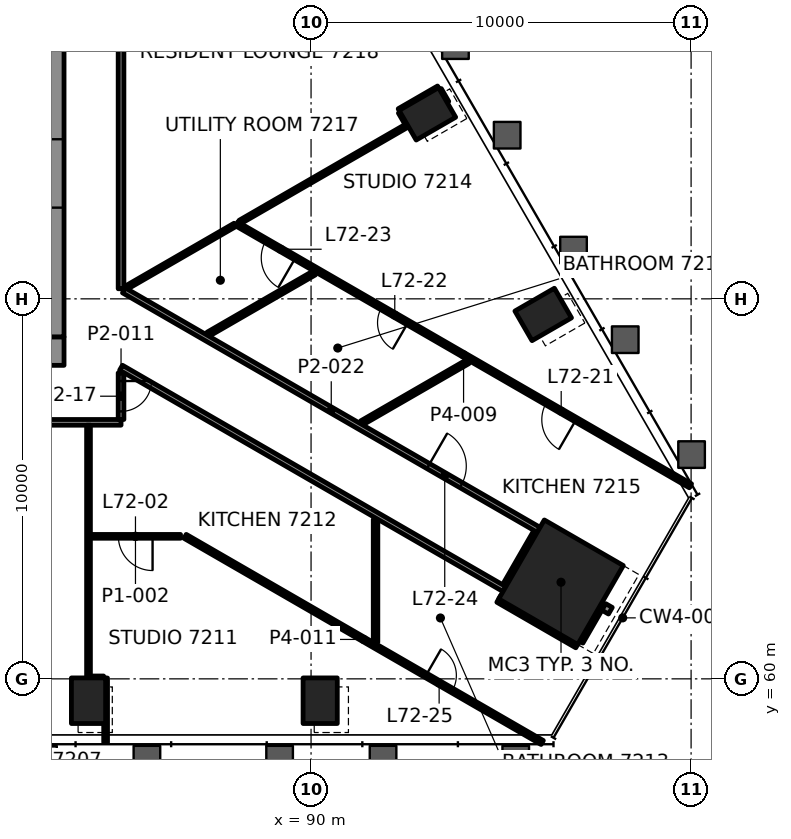
"""IFC4 building model, lengths in metres.
Left out: names, types, materials, properties, quantities, classifications, styles, units other than length and angle.
Written with IfcOpenShell. Run it as: python <this file> out.ifc"""

import sys

from ifc_helpers import new_model, si_unit, direction, frame, frame_2d, origin, origin_2d, place, context, subcontext, project, spatial, rectangle, hollow_rectangle, extrude, element, fill, save


model = new_model("IFC4")
c1 = context("Model", 3, precision=1e-05, world=origin(), true_north=direction((0.0, 1.0)))
c2 = subcontext(c1, "Body", "Model", "MODEL_VIEW")
j1 = project(units=[si_unit("LENGTHUNIT", "METRE"), si_unit("PLANEANGLEUNIT", "RADIAN")], contexts=[c1])
p1 = place(None, origin())
s1 = spatial("IfcSite", under=j1, at=p1, CompositionType="ELEMENT")
p2 = place(p1, origin())
s2 = spatial("IfcBuilding", under=s1, at=p2, CompositionType="ELEMENT")
p3 = place(p2, frame((0.0, 0.0, 298.6)))
s3 = spatial("IfcBuildingStorey", under=s2, at=p3, CompositionType="ELEMENT", Elevation=298.6)
p4 = place(p3, frame((96.577, 62.542, 0.0), z_axis=(0.0, 0.0, 1.0), x_axis=(0.5, 0.866025403784, 0.0)))
e1 = element("IfcColumn", 1, at=p4, inside=s3, PredefinedType="COLUMN", context=c2, shape_type="SweptSolid", body=[
    extrude(rectangle(XDim=2.4, YDim=2.4, at=origin_2d()), origin(), (0.0, 0.0, 1.0), 3.5),
])
for number, where, z_axis, x_axis in (
    (2, (84.144, 59.425, -0.0), (0.0, 0.0, 1.0), (1.0, 0.0, 0.0)),
    (3, (90.24, 59.425, -0.0), (0.0, 0.0, 1.0), (1.0, 0.0, 0.0)),
    (4, (96.109, 69.589, -0.0), (0.0, 0.0, 1.0), (-0.5, 0.866, 0.0)),
    (5, (93.061, 74.869, -0.0), (0.0, 0.0, 1.0), (-0.5, 0.866, 0.0)),
):
    element("IfcColumn", number, at=place(p3, frame(where, z_axis=z_axis, x_axis=x_axis)), inside=s3, PredefinedType="COLUMN", context=c2, shape_type="SweptSolid", body=[
        extrude(hollow_rectangle(XDim=0.9, YDim=1.2, WallThickness=0.06, at=origin_2d()), origin(), (0.0, 0.0, 1.0), 3.5),
    ])
p5 = place(p3, frame((66.5, 68.625, 0.0), z_axis=(0.0, 0.0, 1.0), x_axis=(1.0, 0.0, 0.0)))
e6 = element("IfcWall", 6, at=p5, inside=s3, PredefinedType="SHEAR", context=c2, shape_type="SweptSolid", body=[
    extrude(rectangle(XDim=17.0, YDim=0.75, at=frame_2d((8.5, 0.0))), origin(), (0.0, 0.0, 1.0), 3.3),
])
p6 = place(p5, frame((1.9, 0.0, 0.0)))
e7 = element("IfcOpeningElement", 7, at=p6, cuts=e6, PredefinedType="OPENING", context=c2, shape_type="SweptSolid", body=[
    extrude(rectangle(XDim=0.9, YDim=2.1, at=frame_2d((0.45, 1.05))), frame((0.0, 0.385, 0.0), z_axis=(0.0, -1.0, 0.0), x_axis=(1.0, 0.0, 0.0)), (0.0, 0.0, 1.0), 0.77),
])
p7 = place(p3, frame((83.125, 69.0, 0.0), z_axis=(0.0, 0.0, 1.0), x_axis=(0.0, 1.0, 0.0)))
e8 = element("IfcWall", 8, at=p7, inside=s3, PredefinedType="SHEAR", context=c2, shape_type="SweptSolid", body=[
    extrude(rectangle(XDim=12.0, YDim=0.75, at=frame_2d((6.0, 0.0))), origin(), (0.0, 0.0, 1.0), 3.3),
])
p8 = place(p7, frame((3.4, 0.0, 0.0)))
e9 = element("IfcOpeningElement", 9, at=p8, cuts=e8, PredefinedType="OPENING", context=c2, shape_type="SweptSolid", body=[
    extrude(rectangle(XDim=1.8, YDim=2.1, at=frame_2d((0.9, 1.05))), frame((0.0, 0.385, 0.0), z_axis=(0.0, -1.0, 0.0), x_axis=(1.0, 0.0, 0.0)), (0.0, 0.0, 1.0), 0.77),
])
p9 = place(p3, frame((84.194, 60.025, 0.0), z_axis=(0.0, 0.0, 1.0), x_axis=(1.0, 0.0, 0.0)))
e10 = element("IfcWall", 10, at=p9, inside=s3, PredefinedType="PARTITIONING", context=c2, shape_type="SweptSolid", body=[
    extrude(rectangle(XDim=0.347, YDim=0.1, at=frame_2d((0.173, 0.0))), origin(), (0.0, 0.0, 1.0), 2.7),
])
p10 = place(p3, frame((86.566, 63.75, 0.0), z_axis=(0.0, 0.0, 1.0), x_axis=(-1.0, 0.0, 0.0)))
e11 = element("IfcWall", 11, at=p10, inside=s3, PredefinedType="PARTITIONING", context=c2, shape_type="SweptSolid", body=[
    extrude(rectangle(XDim=2.372, YDim=0.1, at=frame_2d((1.186, 0.0))), origin(), (0.0, 0.0, 1.0), 2.7),
])
p11 = place(p10, frame((0.736, 0.0, 0.0)))
e12 = element("IfcOpeningElement", 12, at=p11, cuts=e11, PredefinedType="OPENING", context=c2, shape_type="SweptSolid", body=[
    extrude(rectangle(XDim=0.9, YDim=2.1, at=frame_2d((0.45, 1.05))), frame((0.0, 0.06, 0.0), z_axis=(0.0, -1.0, 0.0), x_axis=(1.0, 0.0, 0.0)), (0.0, 0.0, 1.0), 0.12),
])
p12 = place(p3, frame((85.0, 66.75, 0.0), z_axis=(0.0, 0.0, 1.0), x_axis=(-1.0, 0.0, 0.0)))
e13 = element("IfcWall", 13, at=p12, inside=s3, PredefinedType="PARTITIONING", context=c2, shape_type="SweptSolid", body=[
    extrude(rectangle(XDim=20.0, YDim=0.15, at=frame_2d((10.0, 0.0))), origin(), (0.0, 0.0, 1.0), 2.7),
])
p13 = place(p12, frame((5.486, 0.0, 0.0)))
e14 = element("IfcOpeningElement", 14, at=p13, cuts=e13, PredefinedType="OPENING", context=c2, shape_type="SweptSolid", body=[
    extrude(rectangle(XDim=0.9, YDim=2.1, at=frame_2d((0.45, 1.05))), frame((0.0, 0.085, 0.0), z_axis=(0.0, -1.0, 0.0), x_axis=(1.0, 0.0, 0.0)), (0.0, 0.0, 1.0), 0.17),
])
p14 = place(p12, frame((11.582, 0.0, 0.0)))
e15 = element("IfcOpeningElement", 15, at=p14, cuts=e13, PredefinedType="OPENING", context=c2, shape_type="SweptSolid", body=[
    extrude(rectangle(XDim=0.9, YDim=2.1, at=frame_2d((0.45, 1.05))), frame((0.0, 0.085, 0.0), z_axis=(0.0, -1.0, 0.0), x_axis=(1.0, 0.0, 0.0)), (0.0, 0.0, 1.0), 0.17),
])
p15 = place(p12, frame((13.614, 0.0, 0.0)))
e16 = element("IfcOpeningElement", 16, at=p15, cuts=e13, PredefinedType="OPENING", context=c2, shape_type="SweptSolid", body=[
    extrude(rectangle(XDim=0.9, YDim=2.1, at=frame_2d((0.45, 1.05))), frame((0.0, 0.085, 0.0), z_axis=(0.0, -1.0, 0.0), x_axis=(1.0, 0.0, 0.0)), (0.0, 0.0, 1.0), 0.17),
])
p16 = place(p12, frame((15.646, 0.0, 0.0)))
e17 = element("IfcOpeningElement", 17, at=p16, cuts=e13, PredefinedType="OPENING", context=c2, shape_type="SweptSolid", body=[
    extrude(rectangle(XDim=0.9, YDim=2.1, at=frame_2d((0.45, 1.05))), frame((0.0, 0.085, 0.0), z_axis=(0.0, -1.0, 0.0), x_axis=(1.0, 0.0, 0.0)), (0.0, 0.0, 1.0), 0.17),
])
p17 = place(p12, frame((17.678, 0.0, 0.0)))
e18 = element("IfcOpeningElement", 18, at=p17, cuts=e13, PredefinedType="OPENING", context=c2, shape_type="SweptSolid", body=[
    extrude(rectangle(XDim=0.9, YDim=2.1, at=frame_2d((0.45, 1.05))), frame((0.0, 0.085, 0.0), z_axis=(0.0, -1.0, 0.0), x_axis=(1.0, 0.0, 0.0)), (0.0, 0.0, 1.0), 0.17),
])
for number, where, z_axis, x_axis in (
    (19, (91.333, 66.736, 0.0), (0.0, 0.0, 1.0), (0.866, 0.5, 0.0)),
    (20, (87.292, 69.069, 0.0), (0.0, 0.0, 1.0), (0.866, 0.5, 0.0)),
):
    element("IfcWall", number, at=place(p3, frame(where, z_axis=z_axis, x_axis=x_axis)), inside=s3, PredefinedType="PARTITIONING", context=c2, shape_type="SweptSolid", body=[
        extrude(rectangle(XDim=3.228, YDim=0.12, at=frame_2d((1.614, 0.0))), origin(), (0.0, 0.0, 1.0), 2.7),
    ])
p18 = place(p3, frame((85.145, 70.299, 0.0), z_axis=(0.0, 0.0, 1.0), x_axis=(0.866032610133, 0.499987518031, 0.0)))
e21 = element("IfcWall", 21, at=p18, inside=s3, PredefinedType="PARTITIONING", context=c2, shape_type="SweptSolid", body=[
    extrude(rectangle(XDim=3.295, YDim=0.1, at=frame_2d((1.648, 0.0))), origin(), (0.0, 0.0, 1.0), 2.7),
])
p19 = place(p3, frame((92.318, 74.959, 0.0), z_axis=(0.0, 0.0, 1.0), x_axis=(0.866087020037, 0.499893262331, 0.0)))
e22 = element("IfcWall", 22, at=p19, inside=s3, PredefinedType="PARTITIONING", context=c2, shape_type="SweptSolid", body=[
    extrude(rectangle(XDim=1.196, YDim=0.1, at=frame_2d((0.598, 0.0))), origin(), (0.0, 0.0, 1.0), 2.688),
])
p20 = place(p3, frame((97.067, 60.99, 0.0), z_axis=(0.0, 0.0, 1.0), x_axis=(0.499818604933, 0.866130106949, 0.0)))
e23 = element("IfcWall", 23, at=p20, inside=s3, PredefinedType="PARTITIONING", context=c2, shape_type="SweptSolid", body=[
    extrude(rectangle(XDim=1.099, YDim=0.2, at=frame_2d((0.55, 0.0))), origin(), (0.0, 0.0, 1.0), 2.7),
])
p21 = place(p3, frame((95.128, 62.433, 0.0), z_axis=(0.0, 0.0, 1.0), x_axis=(0.500052415518, 0.865995139556, 0.0)))
e24 = element("IfcWall", 24, at=p21, inside=s3, PredefinedType="PARTITIONING", context=c2, shape_type="SweptSolid", body=[
    extrude(rectangle(XDim=1.644, YDim=0.2, at=frame_2d((0.822, 0.0))), origin(), (0.0, 0.0, 1.0), 2.547),
])
p22 = place(p3, frame((91.697, 60.966, 0.0), z_axis=(0.0, 0.0, 1.0), x_axis=(0.0, 1.0, 0.0)))
e25 = element("IfcWall", 25, at=p22, inside=s3, PredefinedType="PARTITIONING", context=c2, shape_type="SweptSolid", body=[
    extrude(rectangle(XDim=3.228, YDim=0.12, at=frame_2d((1.614, 0.0))), origin(), (0.0, 0.0, 1.0), 2.7),
])
p23 = place(p3, frame((85.0, 68.051, 0.0), z_axis=(0.0, 0.0, 1.0), x_axis=(0.0, -1.0, 0.0)))
e26 = element("IfcWall", 26, at=p23, inside=s3, PredefinedType="PARTITIONING", context=c2, shape_type="SweptSolid", body=[
    extrude(rectangle(XDim=1.226, YDim=0.15, at=frame_2d((0.613, 0.0))), origin(), (0.0, 0.0, 1.0), 2.547),
])
p24 = place(p23, frame((0.213, 0.0, 0.0)))
e27 = element("IfcOpeningElement", 27, at=p24, cuts=e26, PredefinedType="OPENING", context=c2, shape_type="SweptSolid", body=[
    extrude(rectangle(XDim=0.8, YDim=2.1, at=frame_2d((0.4, 1.05))), frame((0.0, 0.085, 0.0), z_axis=(0.0, -1.0, 0.0), x_axis=(1.0, 0.0, 0.0)), (0.0, 0.0, 1.0), 0.17),
])
p25 = place(p3, frame((85.0, 70.266, 0.0), z_axis=(0.0, 0.0, 1.0), x_axis=(0.0, 1.0, 0.0)))
e28 = element("IfcWall", 28, at=p25, inside=s3, PredefinedType="PARTITIONING", context=c2, shape_type="SweptSolid", body=[
    extrude(rectangle(XDim=12.982, YDim=0.15, at=frame_2d((6.491, 0.0))), origin(), (0.0, 0.0, 1.0), 2.7),
])
p26 = place(p3, frame((84.594, 58.325, 0.0), z_axis=(0.0, 0.0, 1.0), x_axis=(0.0, 1.0, 0.0)))
e29 = element("IfcWall", 29, at=p26, inside=s3, PredefinedType="PARTITIONING", context=c2, shape_type="SweptSolid", body=[
    extrude(rectangle(XDim=1.697, YDim=0.1, at=frame_2d((0.849, 0.0))), origin(), (0.0, 0.0, 1.0), 2.7),
])
p27 = place(p3, frame((84.144, 60.025, 0.0), z_axis=(0.0, 0.0, 1.0), x_axis=(0.0, 1.0, 0.0)))
e30 = element("IfcWall", 30, at=p27, inside=s3, PredefinedType="PARTITIONING", context=c2, shape_type="SweptSolid", body=[
    extrude(rectangle(XDim=6.65, YDim=0.1, at=frame_2d((3.325, 0.0))), origin(), (0.0, 0.0, 1.0), 2.7),
])
p28 = place(p3, frame((93.58, 75.169, 0.0), z_axis=(0.0, 0.0, 1.0), x_axis=(-0.500153222552, 0.865936922628, 0.0)))
e31 = element("IfcWall", 31, at=p28, inside=s3, PredefinedType="PARTITIONING", context=c2, shape_type="SweptSolid", body=[
    extrude(rectangle(XDim=0.393, YDim=0.1, at=frame_2d((0.196, 0.0))), origin(), (0.0, 0.0, 1.0), 2.7),
])
p29 = place(p3, frame((92.511, 74.621, 0.0), z_axis=(0.0, 0.0, 1.0), x_axis=(-0.499868360126, 0.866101392762, 0.0)))
e32 = element("IfcWall", 32, at=p29, inside=s3, PredefinedType="PARTITIONING", context=c2, shape_type="SweptSolid", body=[
    extrude(rectangle(XDim=0.338, YDim=0.1, at=frame_2d((0.169, 0.0))), origin(), (0.0, 0.0, 1.0), 2.7),
])
p30 = place(p3, frame((99.982, 65.08, 0.0), z_axis=(0.0, 0.0, 1.0), x_axis=(-0.86602868724, 0.499994312846, 0.0)))
e33 = element("IfcWall", 33, at=p30, inside=s3, PredefinedType="PARTITIONING", context=c2, shape_type="SweptSolid", body=[
    extrude(rectangle(XDim=13.785, YDim=0.12, at=frame_2d((6.893, 0.0))), origin(), (0.0, 0.0, 1.0), 2.7),
])
p31 = place(p30, frame((3.477, 0.0, 0.0)))
e34 = element("IfcOpeningElement", 34, at=p31, cuts=e33, PredefinedType="OPENING", context=c2, shape_type="SweptSolid", body=[
    extrude(rectangle(XDim=0.9, YDim=2.1, at=frame_2d((0.45, 1.05))), frame((0.0, 0.07, 0.0), z_axis=(0.0, -1.0, 0.0), x_axis=(1.0, 0.0, 0.0)), (0.0, 0.0, 1.0), 0.14),
])
p32 = place(p30, frame((8.583, 0.0, 0.0)))
e35 = element("IfcOpeningElement", 35, at=p32, cuts=e33, PredefinedType="OPENING", context=c2, shape_type="SweptSolid", body=[
    extrude(rectangle(XDim=0.8, YDim=2.1, at=frame_2d((0.4, 1.05))), frame((0.0, 0.07, 0.0), z_axis=(0.0, -1.0, 0.0), x_axis=(1.0, 0.0, 0.0)), (0.0, 0.0, 1.0), 0.14),
])
p33 = place(p30, frame((12.001, 0.0, 0.0)))
e36 = element("IfcOpeningElement", 36, at=p33, cuts=e33, PredefinedType="OPENING", context=c2, shape_type="SweptSolid", body=[
    extrude(rectangle(XDim=0.9, YDim=2.1, at=frame_2d((0.45, 1.05))), frame((0.0, 0.07, 0.0), z_axis=(0.0, -1.0, 0.0), x_axis=(1.0, 0.0, 0.0)), (0.0, 0.0, 1.0), 0.14),
])
p34 = place(p3, frame((85.075, 70.222, 0.0), z_axis=(0.0, 0.0, 1.0), x_axis=(0.866023935413, -0.500002543286, 0.0)))
e37 = element("IfcWall", 37, at=p34, inside=s3, PredefinedType="PARTITIONING", context=c2, shape_type="SweptSolid", body=[
    extrude(rectangle(XDim=12.601, YDim=0.15, at=frame_2d((6.3, 0.0))), origin(), (0.0, 0.0, 1.0), 2.7),
])
p35 = place(p34, frame((9.249, 0.0, 0.0)))
e38 = element("IfcOpeningElement", 38, at=p35, cuts=e37, PredefinedType="OPENING", context=c2, shape_type="SweptSolid", body=[
    extrude(rectangle(XDim=1.0, YDim=2.1, at=frame_2d((0.5, 1.05))), frame((0.0, 0.085, 0.0), z_axis=(0.0, -1.0, 0.0), x_axis=(1.0, 0.0, 0.0)), (0.0, 0.0, 1.0), 0.17),
])
p36 = place(p3, frame((97.876, 61.792, 0.0), z_axis=(0.0, 0.0, 1.0), x_axis=(-0.865900389786, 0.500216468111, 0.0)))
e39 = element("IfcWall", 39, at=p36, inside=s3, PredefinedType="PARTITIONING", context=c2, shape_type="SweptSolid", body=[
    extrude(rectangle(XDim=0.2, YDim=0.2, at=frame_2d((0.1, 0.0))), origin(), (0.0, 0.0, 1.0), 2.7),
])
p37 = place(p3, frame((95.088, 62.363, 0.0), z_axis=(0.0, 0.0, 1.0), x_axis=(-0.866026430432, 0.49999822179, 0.0)))
e40 = element("IfcWall", 40, at=p37, inside=s3, PredefinedType="PARTITIONING", context=c2, shape_type="SweptSolid", body=[
    extrude(rectangle(XDim=11.648, YDim=0.15, at=frame_2d((5.824, 0.0))), origin(), (0.0, 0.0, 1.0), 2.547),
])
p38 = place(p3, frame((97.016, 60.904, 0.0), z_axis=(0.0, 0.0, 1.0), x_axis=(-0.866036455013, 0.499980858223, 0.0)))
e41 = element("IfcWall", 41, at=p38, inside=s3, PredefinedType="PARTITIONING", context=c2, shape_type="SweptSolid", body=[
    extrude(rectangle(XDim=2.399, YDim=0.2, at=frame_2d((1.199, 0.0))), origin(), (0.0, 0.0, 1.0), 2.7),
])
p39 = place(p3, frame((86.686, 63.75, 0.0), z_axis=(0.0, 0.0, 1.0), x_axis=(0.8660274679, -0.499996424829, 0.0)))
e42 = element("IfcWall", 42, at=p39, inside=s3, PredefinedType="PARTITIONING", context=c2, shape_type="SweptSolid", body=[
    extrude(rectangle(XDim=10.851, YDim=0.12, at=frame_2d((5.425, 0.0))), origin(), (0.0, 0.0, 1.0), 2.7),
])
p40 = place(p39, frame((7.318, 0.0, 0.0)))
e43 = element("IfcOpeningElement", 43, at=p40, cuts=e42, PredefinedType="OPENING", context=c2, shape_type="SweptSolid", body=[
    extrude(rectangle(XDim=0.8, YDim=2.1, at=frame_2d((0.4, 1.05))), frame((0.0, 0.07, 0.0), z_axis=(0.0, -1.0, 0.0), x_axis=(1.0, 0.0, 0.0)), (0.0, 0.0, 1.0), 0.14),
])
p41 = place(p3, frame((88.129, 72.021, 0.0), z_axis=(0.0, 0.0, 1.0), x_axis=(0.866010809447, 0.500025277282, 0.0)))
e44 = element("IfcWall", 44, at=p41, inside=s3, PredefinedType="PARTITIONING", context=c2, shape_type="SweptSolid", body=[
    extrude(rectangle(XDim=5.094, YDim=0.1, at=frame_2d((2.547, 0.0))), origin(), (0.0, 0.0, 1.0), 2.7),
])
p42 = place(p11, origin())
e45 = element("IfcDoor", 45, at=p42, inside=s3, OperationType="SINGLE_SWING_LEFT", PredefinedType="DOOR", context=c2, shape_type="SweptSolid", body=[
    extrude(rectangle(XDim=0.9, YDim=2.1, at=frame_2d((0.45, 1.05))), frame((0.0, 0.025, 0.0), z_axis=(0.0, -1.0, 0.0), x_axis=(1.0, 0.0, 0.0)), (0.0, 0.0, 1.0), 0.05),
])
fill(e12, e45)
p43 = place(p24, origin())
e46 = element("IfcDoor", 46, at=p43, inside=s3, OperationType="SINGLE_SWING_RIGHT", PredefinedType="DOOR", context=c2, shape_type="SweptSolid", body=[
    extrude(rectangle(XDim=0.8, YDim=2.1, at=frame_2d((0.4, 1.05))), frame((0.0, 0.025, 0.0), z_axis=(0.0, -1.0, 0.0), x_axis=(1.0, 0.0, 0.0)), (0.0, 0.0, 1.0), 0.05),
])
fill(e27, e46)
p44 = place(p31, origin())
e47 = element("IfcDoor", 47, at=p44, inside=s3, OperationType="SINGLE_SWING_RIGHT", PredefinedType="DOOR", context=c2, shape_type="SweptSolid", body=[
    extrude(rectangle(XDim=0.9, YDim=2.1, at=frame_2d((0.45, 1.05))), frame((0.0, 0.025, 0.0), z_axis=(0.0, -1.0, 0.0), x_axis=(1.0, 0.0, 0.0)), (0.0, 0.0, 1.0), 0.05),
])
fill(e34, e47)
p45 = place(p32, origin())
e48 = element("IfcDoor", 48, at=p45, inside=s3, OperationType="SINGLE_SWING_RIGHT", PredefinedType="DOOR", context=c2, shape_type="SweptSolid", body=[
    extrude(rectangle(XDim=0.8, YDim=2.1, at=frame_2d((0.4, 1.05))), frame((0.0, 0.025, 0.0), z_axis=(0.0, -1.0, 0.0), x_axis=(1.0, 0.0, 0.0)), (0.0, 0.0, 1.0), 0.05),
])
fill(e35, e48)
p46 = place(p33, origin())
e49 = element("IfcDoor", 49, at=p46, inside=s3, OperationType="SINGLE_SWING_LEFT", PredefinedType="DOOR", context=c2, shape_type="SweptSolid", body=[
    extrude(rectangle(XDim=0.9, YDim=2.1, at=frame_2d((0.45, 1.05))), frame((0.0, 0.025, 0.0), z_axis=(0.0, -1.0, 0.0), x_axis=(1.0, 0.0, 0.0)), (0.0, 0.0, 1.0), 0.05),
])
fill(e36, e49)
p47 = place(p35, origin())
e50 = element("IfcDoor", 50, at=p47, inside=s3, OperationType="SINGLE_SWING_RIGHT", PredefinedType="DOOR", context=c2, shape_type="SweptSolid", body=[
    extrude(rectangle(XDim=1.0, YDim=2.1, at=frame_2d((0.5, 1.05))), frame((0.0, 0.025, 0.0), z_axis=(0.0, -1.0, 0.0), x_axis=(1.0, 0.0, 0.0)), (0.0, 0.0, 1.0), 0.05),
])
fill(e38, e50)
p48 = place(p40, origin())
e51 = element("IfcDoor", 51, at=p48, inside=s3, OperationType="SINGLE_SWING_LEFT", PredefinedType="DOOR", context=c2, shape_type="SweptSolid", body=[
    extrude(rectangle(XDim=0.8, YDim=2.1, at=frame_2d((0.4, 1.05))), frame((0.0, 0.025, 0.0), z_axis=(0.0, -1.0, 0.0), x_axis=(1.0, 0.0, 0.0)), (0.0, 0.0, 1.0), 0.05),
])
fill(e43, e51)
p49 = place(p8, origin())
e52 = element("IfcDoor", 52, at=p49, inside=s3, OperationType="SINGLE_SWING_LEFT", PredefinedType="DOOR", context=c2, shape_type="SweptSolid", body=[
    extrude(rectangle(XDim=1.8, YDim=2.1, at=frame_2d((0.9, 1.05))), frame((0.0, 0.095, 0.0), z_axis=(0.0, -1.0, 0.0), x_axis=(1.0, 0.0, 0.0)), (0.0, 0.0, 1.0), 0.19),
])
fill(e9, e52)
save(model, sys.argv[1])
